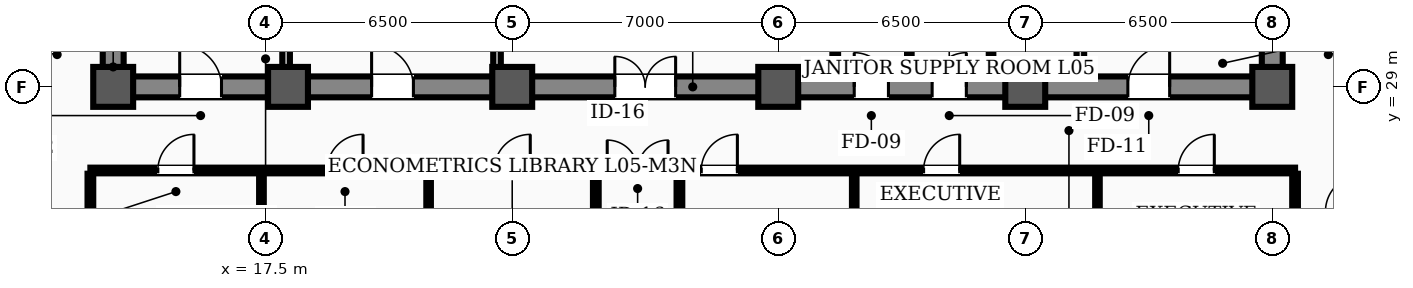
"""IFC4 building model, lengths in metres.
Left out: names, types, materials, properties, quantities, classifications, styles, units other than length and angle.
Written with IfcOpenShell. Run it as: python <this file> out.ifc"""

import sys

from ifc_helpers import new_model, si_unit, direction, frame, frame_2d, origin, origin_2d, place, context, subcontext, project, spatial, rectangle, hollow_rectangle, extrude, element, fill, save


model = new_model("IFC4")
c1 = context("Model", 3, precision=1e-05, world=origin(), true_north=direction((0.0, 1.0)))
c2 = subcontext(c1, "Body", "Model", "MODEL_VIEW")
j1 = project(units=[si_unit("LENGTHUNIT", "METRE"), si_unit("PLANEANGLEUNIT", "RADIAN")], contexts=[c1])
p1 = place(None, origin())
s1 = spatial("IfcSite", under=j1, at=p1, CompositionType="ELEMENT")
p2 = place(p1, origin())
s2 = spatial("IfcBuilding", under=s1, at=p2, CompositionType="ELEMENT")
p3 = place(p2, frame((0.0, 0.0, 22.0)))
s3 = spatial("IfcBuildingStorey", under=s2, at=p3, CompositionType="ELEMENT", Elevation=22.0)
for number, where, z_axis, x_axis in (
    (1, (13.5, 29.0, 0.0), (0.0, 0.0, 1.0), (1.0, 0.0, 0.0)),
    (2, (18.1, 29.0, 0.0), (0.0, 0.0, 1.0), (1.0, 0.0, 0.0)),
    (3, (24.0, 29.0, 0.0), (0.0, 0.0, 1.0), (1.0, 0.0, 0.0)),
    (4, (31.0, 29.0, 0.0), (0.0, 0.0, 1.0), (1.0, 0.0, 0.0)),
    (5, (37.5, 29.0, 0.0), (0.0, 0.0, 1.0), (1.0, 0.0, 0.0)),
    (6, (44.0, 29.0, 0.0), (0.0, 0.0, 1.0), (1.0, 0.0, 0.0)),
):
    element("IfcColumn", number, at=place(p3, frame(where, z_axis=z_axis, x_axis=x_axis)), inside=s3, PredefinedType="COLUMN", context=c2, shape_type="SweptSolid", body=[
        extrude(hollow_rectangle(XDim=1.05, YDim=1.05, WallThickness=0.038, InnerFilletRadius=0.019, OuterFilletRadius=0.057, at=origin_2d()), origin(), (0.0, 0.0, 1.0), 4.5),
    ])
p4 = place(p3, frame((13.5, 29.0, 0.0), z_axis=(0.0, 0.0, 1.0), x_axis=(1.0, 0.0, 0.0)))
e7 = element("IfcWall", 7, at=p4, inside=s3, PredefinedType="SHEAR", context=c2, shape_type="SweptSolid", body=[
    extrude(rectangle(XDim=30.5, YDim=0.55, at=frame_2d((15.25, 0.0))), origin(), (0.0, 0.0, 1.0), 4.32),
])
p5 = place(p4, frame((1.75, 0.0, 0.0)))
e8 = element("IfcOpeningElement", 8, at=p5, cuts=e7, PredefinedType="OPENING", context=c2, shape_type="SweptSolid", body=[
    extrude(rectangle(XDim=1.1, YDim=2.08, at=frame_2d((0.55, 1.04))), frame((0.0, 0.285, 0.0), z_axis=(0.0, -1.0, 0.0), x_axis=(1.0, 0.0, 0.0)), (0.0, 0.0, 1.0), 0.57),
])
p6 = place(p4, frame((26.7, 0.0, 0.0)))
e9 = element("IfcOpeningElement", 9, at=p6, cuts=e7, PredefinedType="OPENING", context=c2, shape_type="SweptSolid", body=[
    extrude(rectangle(XDim=1.1, YDim=2.08, at=frame_2d((0.55, 1.04))), frame((0.0, 0.285, 0.0), z_axis=(0.0, -1.0, 0.0), x_axis=(1.0, 0.0, 0.0)), (0.0, 0.0, 1.0), 0.57),
])
p7 = place(p4, frame((6.8, 0.0, 0.0)))
e10 = element("IfcOpeningElement", 10, at=p7, cuts=e7, PredefinedType="OPENING", context=c2, shape_type="SweptSolid", body=[
    extrude(rectangle(XDim=1.1, YDim=2.08, at=frame_2d((0.55, 1.04))), frame((0.0, 0.285, 0.0), z_axis=(0.0, -1.0, 0.0), x_axis=(1.0, 0.0, 0.0)), (0.0, 0.0, 1.0), 0.57),
])
p8 = place(p4, frame((13.2, 0.0, 0.0)))
e11 = element("IfcOpeningElement", 11, at=p8, cuts=e7, PredefinedType="OPENING", context=c2, shape_type="SweptSolid", body=[
    extrude(rectangle(XDim=1.6, YDim=2.08, at=frame_2d((0.8, 1.04))), frame((0.0, 0.285, 0.0), z_axis=(0.0, -1.0, 0.0), x_axis=(1.0, 0.0, 0.0)), (0.0, 0.0, 1.0), 0.57),
])
p9 = place(p4, frame((19.5, 0.0, 0.0)))
e12 = element("IfcOpeningElement", 12, at=p9, cuts=e7, PredefinedType="OPENING", context=c2, shape_type="SweptSolid", body=[
    extrude(rectangle(XDim=0.9, YDim=2.08, at=frame_2d((0.45, 1.04))), frame((0.0, 0.285, 0.0), z_axis=(0.0, -1.0, 0.0), x_axis=(1.0, 0.0, 0.0)), (0.0, 0.0, 1.0), 0.57),
])
p10 = place(p4, frame((21.55, 0.0, 0.0)))
e13 = element("IfcOpeningElement", 13, at=p10, cuts=e7, PredefinedType="OPENING", context=c2, shape_type="SweptSolid", body=[
    extrude(rectangle(XDim=0.9, YDim=2.08, at=frame_2d((0.45, 1.04))), frame((0.0, 0.285, 0.0), z_axis=(0.0, -1.0, 0.0), x_axis=(1.0, 0.0, 0.0)), (0.0, 0.0, 1.0), 0.57),
])
for number, where, z_axis, x_axis in (
    (14, (13.5, 29.35, 0.0), (0.0, 0.0, 1.0), (0.0, 1.0, 0.0)),
    (15, (44.0, 29.35, 0.0), (0.0, 0.0, 1.0), (0.0, 1.0, 0.0)),
):
    element("IfcWall", number, at=place(p3, frame(where, z_axis=z_axis, x_axis=x_axis)), inside=s3, PredefinedType="SHEAR", context=c2, shape_type="SweptSolid", body=[
        extrude(rectangle(XDim=8.6, YDim=0.55, at=frame_2d((4.3, 0.0))), origin(), (0.0, 0.0, 1.0), 4.32),
    ])
p11 = place(p3, frame((12.9, 26.8, 0.0), z_axis=(0.0, 0.0, 1.0), x_axis=(1.0, 0.0, 0.0)))
e16 = element("IfcWall", 16, at=p11, inside=s3, PredefinedType="PARTITIONING", context=c2, shape_type="SweptSolid", body=[
    extrude(rectangle(XDim=31.7, YDim=0.15, at=frame_2d((15.85, 0.0))), origin(), (0.0, 0.0, 1.0), 3.7),
])
p12 = place(p11, frame((13.6, 0.0, 0.0)))
e17 = element("IfcOpeningElement", 17, at=p12, cuts=e16, PredefinedType="OPENING", context=c2, shape_type="SweptSolid", body=[
    extrude(rectangle(XDim=1.6, YDim=2.08, at=frame_2d((0.8, 1.04))), frame((0.0, 0.085, 0.0), z_axis=(0.0, -1.0, 0.0), x_axis=(1.0, 0.0, 0.0)), (0.0, 0.0, 1.0), 0.17),
])
p13 = place(p11, frame((1.775, 0.0, 0.0)))
e18 = element("IfcOpeningElement", 18, at=p13, cuts=e16, PredefinedType="OPENING", context=c2, shape_type="SweptSolid", body=[
    extrude(rectangle(XDim=0.95, YDim=2.08, at=frame_2d((0.475, 1.04))), frame((0.0, 0.085, 0.0), z_axis=(0.0, -1.0, 0.0), x_axis=(1.0, 0.0, 0.0)), (0.0, 0.0, 1.0), 0.17),
])
p14 = place(p11, frame((6.225, 0.0, 0.0)))
e19 = element("IfcOpeningElement", 19, at=p14, cuts=e16, PredefinedType="OPENING", context=c2, shape_type="SweptSolid", body=[
    extrude(rectangle(XDim=0.95, YDim=2.08, at=frame_2d((0.475, 1.04))), frame((0.0, 0.085, 0.0), z_axis=(0.0, -1.0, 0.0), x_axis=(1.0, 0.0, 0.0)), (0.0, 0.0, 1.0), 0.17),
])
p15 = place(p11, frame((10.625, 0.0, 0.0)))
e20 = element("IfcOpeningElement", 20, at=p15, cuts=e16, PredefinedType="OPENING", context=c2, shape_type="SweptSolid", body=[
    extrude(rectangle(XDim=0.95, YDim=2.08, at=frame_2d((0.475, 1.04))), frame((0.0, 0.085, 0.0), z_axis=(0.0, -1.0, 0.0), x_axis=(1.0, 0.0, 0.0)), (0.0, 0.0, 1.0), 0.17),
])
p16 = place(p11, frame((16.075, 0.0, 0.0)))
e21 = element("IfcOpeningElement", 21, at=p16, cuts=e16, PredefinedType="OPENING", context=c2, shape_type="SweptSolid", body=[
    extrude(rectangle(XDim=0.95, YDim=2.08, at=frame_2d((0.475, 1.04))), frame((0.0, 0.085, 0.0), z_axis=(0.0, -1.0, 0.0), x_axis=(1.0, 0.0, 0.0)), (0.0, 0.0, 1.0), 0.17),
])
p17 = place(p11, frame((21.925, 0.0, 0.0)))
e22 = element("IfcOpeningElement", 22, at=p17, cuts=e16, PredefinedType="OPENING", context=c2, shape_type="SweptSolid", body=[
    extrude(rectangle(XDim=0.95, YDim=2.08, at=frame_2d((0.475, 1.04))), frame((0.0, 0.085, 0.0), z_axis=(0.0, -1.0, 0.0), x_axis=(1.0, 0.0, 0.0)), (0.0, 0.0, 1.0), 0.17),
])
p18 = place(p11, frame((28.625, 0.0, 0.0)))
e23 = element("IfcOpeningElement", 23, at=p18, cuts=e16, PredefinedType="OPENING", context=c2, shape_type="SweptSolid", body=[
    extrude(rectangle(XDim=0.95, YDim=2.08, at=frame_2d((0.475, 1.04))), frame((0.0, 0.085, 0.0), z_axis=(0.0, -1.0, 0.0), x_axis=(1.0, 0.0, 0.0)), (0.0, 0.0, 1.0), 0.17),
])
for number, where, z_axis, x_axis in (
    (24, (18.05, 29.285, 0.0), (0.0, 0.0, 1.0), (0.0, 1.0, 0.0)),
    (25, (38.95, 29.285, 0.0), (0.0, 0.0, 1.0), (0.0, 1.0, 0.0)),
):
    element("IfcWall", number, at=place(p3, frame(where, z_axis=z_axis, x_axis=x_axis)), inside=s3, PredefinedType="STANDARD", context=c2, shape_type="SweptSolid", body=[
        extrude(rectangle(XDim=1.015, YDim=0.2, at=frame_2d((0.508, 0.0))), origin(), (0.0, 0.0, 1.0), 3.9),
    ])
p19 = place(p3, frame((23.6, 29.285, 0.0), z_axis=(0.0, 0.0, 1.0), x_axis=(0.0, 1.0, 0.0)))
e26 = element("IfcWall", 26, at=p19, inside=s3, PredefinedType="STANDARD", context=c2, shape_type="SweptSolid", body=[
    extrude(rectangle(XDim=5.415, YDim=0.2, at=frame_2d((2.708, 0.0))), origin(), (0.0, 0.0, 1.0), 3.7),
])
p20 = place(p3, frame((32.5, 29.285, 0.0), z_axis=(0.0, 0.0, 1.0), x_axis=(0.0, 1.0, 0.0)))
e27 = element("IfcWall", 27, at=p20, inside=s3, PredefinedType="PARTITIONING", context=c2, shape_type="SweptSolid", body=[
    extrude(rectangle(XDim=2.48, YDim=0.15, at=frame_2d((1.24, 0.0))), origin(), (0.0, 0.0, 1.0), 3.9),
])
for number, where, z_axis, x_axis in (
    (28, (36.6, 29.285, 0.0), (0.0, 0.0, 1.0), (0.0, 1.0, 0.0)),
    (29, (34.45, 29.285, 0.0), (0.0, 0.0, 1.0), (0.0, 1.0, 0.0)),
):
    element("IfcWall", number, at=place(p3, frame(where, z_axis=z_axis, x_axis=x_axis)), inside=s3, PredefinedType="PARTITIONING", context=c2, shape_type="SweptSolid", body=[
        extrude(rectangle(XDim=2.48, YDim=0.12, at=frame_2d((1.24, 0.0))), origin(), (0.0, 0.0, 1.0), 3.9),
    ])
for number, where, z_axis, x_axis in (
    (30, (26.2, 19.335, 0.0), (0.0, 0.0, 1.0), (0.0, 1.0, 0.0)),
    (31, (28.4, 19.335, 0.0), (0.0, 0.0, 1.0), (0.0, 1.0, 0.0)),
    (32, (12.9, 19.335, 0.0), (0.0, 0.0, 1.0), (0.0, 1.0, 0.0)),
    (33, (44.6, 19.335, 0.0), (0.0, 0.0, 1.0), (0.0, 1.0, 0.0)),
):
    element("IfcWall", number, at=place(p3, frame(where, z_axis=z_axis, x_axis=x_axis)), inside=s3, PredefinedType="PARTITIONING", context=c2, shape_type="SweptSolid", body=[
        extrude(rectangle(XDim=7.38, YDim=0.15, at=frame_2d((3.69, 0.0))), origin(), (0.0, 0.0, 1.0), 3.6),
    ])
for number, where, z_axis, x_axis in (
    (34, (17.4, 19.335, 0.0), (0.0, 0.0, 1.0), (0.0, 1.0, 0.0)),
    (35, (21.8, 19.335, 0.0), (0.0, 0.0, 1.0), (0.0, 1.0, 0.0)),
    (36, (33.0, 19.335, 0.0), (0.0, 0.0, 1.0), (0.0, 1.0, 0.0)),
    (37, (39.4, 19.335, 0.0), (0.0, 0.0, 1.0), (0.0, 1.0, 0.0)),
):
    element("IfcWall", number, at=place(p3, frame(where, z_axis=z_axis, x_axis=x_axis)), inside=s3, PredefinedType="PARTITIONING", context=c2, shape_type="SweptSolid", body=[
        extrude(rectangle(XDim=7.38, YDim=0.12, at=frame_2d((3.69, 0.0))), origin(), (0.0, 0.0, 1.0), 3.6),
    ])
p21 = place(p5, origin())
e38 = element("IfcDoor", 38, at=p21, inside=s3, OperationType="SINGLE_SWING_LEFT", PredefinedType="DOOR", context=c2, shape_type="SweptSolid", body=[
    extrude(rectangle(XDim=1.1, YDim=2.08, at=frame_2d((0.55, 1.04))), frame((0.0, 0.025, 0.0), z_axis=(0.0, -1.0, 0.0), x_axis=(1.0, 0.0, 0.0)), (0.0, 0.0, 1.0), 0.05),
])
fill(e8, e38)
p22 = place(p6, origin())
e39 = element("IfcDoor", 39, at=p22, inside=s3, OperationType="SINGLE_SWING_RIGHT", PredefinedType="DOOR", context=c2, shape_type="SweptSolid", body=[
    extrude(rectangle(XDim=1.1, YDim=2.08, at=frame_2d((0.55, 1.04))), frame((0.0, 0.025, 0.0), z_axis=(0.0, -1.0, 0.0), x_axis=(1.0, 0.0, 0.0)), (0.0, 0.0, 1.0), 0.05),
])
fill(e9, e39)
p23 = place(p7, origin())
e40 = element("IfcDoor", 40, at=p23, inside=s3, OperationType="SINGLE_SWING_LEFT", PredefinedType="DOOR", context=c2, shape_type="SweptSolid", body=[
    extrude(rectangle(XDim=1.1, YDim=2.08, at=frame_2d((0.55, 1.04))), frame((0.0, 0.025, 0.0), z_axis=(0.0, -1.0, 0.0), x_axis=(1.0, 0.0, 0.0)), (0.0, 0.0, 1.0), 0.05),
])
fill(e10, e40)
p24 = place(p8, origin())
e41 = element("IfcDoor", 41, at=p24, inside=s3, OperationType="DOUBLE_DOOR_SINGLE_SWING", PredefinedType="DOOR", context=c2, shape_type="SweptSolid", body=[
    extrude(rectangle(XDim=1.6, YDim=2.08, at=frame_2d((0.8, 1.04))), frame((0.0, 0.025, 0.0), z_axis=(0.0, -1.0, 0.0), x_axis=(1.0, 0.0, 0.0)), (0.0, 0.0, 1.0), 0.05),
])
fill(e11, e41)
p25 = place(p9, origin())
e42 = element("IfcDoor", 42, at=p25, inside=s3, OperationType="SINGLE_SWING_LEFT", PredefinedType="DOOR", context=c2, shape_type="SweptSolid", body=[
    extrude(rectangle(XDim=0.9, YDim=2.08, at=frame_2d((0.45, 1.04))), frame((0.0, 0.025, 0.0), z_axis=(0.0, -1.0, 0.0), x_axis=(1.0, 0.0, 0.0)), (0.0, 0.0, 1.0), 0.05),
])
fill(e12, e42)
p26 = place(p10, origin())
e43 = element("IfcDoor", 43, at=p26, inside=s3, OperationType="SINGLE_SWING_RIGHT", PredefinedType="DOOR", context=c2, shape_type="SweptSolid", body=[
    extrude(rectangle(XDim=0.9, YDim=2.08, at=frame_2d((0.45, 1.04))), frame((0.0, 0.025, 0.0), z_axis=(0.0, -1.0, 0.0), x_axis=(1.0, 0.0, 0.0)), (0.0, 0.0, 1.0), 0.05),
])
fill(e13, e43)
p27 = place(p12, origin())
e44 = element("IfcDoor", 44, at=p27, inside=s3, OperationType="DOUBLE_DOOR_SINGLE_SWING", PredefinedType="DOOR", context=c2, shape_type="SweptSolid", body=[
    extrude(rectangle(XDim=1.6, YDim=2.08, at=frame_2d((0.8, 1.04))), frame((0.0, 0.025, 0.0), z_axis=(0.0, -1.0, 0.0), x_axis=(1.0, 0.0, 0.0)), (0.0, 0.0, 1.0), 0.05),
])
fill(e17, e44)
p28 = place(p13, origin())
e45 = element("IfcDoor", 45, at=p28, inside=s3, OperationType="SINGLE_SWING_RIGHT", PredefinedType="DOOR", context=c2, shape_type="SweptSolid", body=[
    extrude(rectangle(XDim=0.95, YDim=2.08, at=frame_2d((0.475, 1.04))), frame((0.0, 0.025, 0.0), z_axis=(0.0, -1.0, 0.0), x_axis=(1.0, 0.0, 0.0)), (0.0, 0.0, 1.0), 0.05),
])
fill(e18, e45)
p29 = place(p14, origin())
e46 = element("IfcDoor", 46, at=p29, inside=s3, OperationType="SINGLE_SWING_RIGHT", PredefinedType="DOOR", context=c2, shape_type="SweptSolid", body=[
    extrude(rectangle(XDim=0.95, YDim=2.08, at=frame_2d((0.475, 1.04))), frame((0.0, 0.025, 0.0), z_axis=(0.0, -1.0, 0.0), x_axis=(1.0, 0.0, 0.0)), (0.0, 0.0, 1.0), 0.05),
])
fill(e19, e46)
p30 = place(p15, origin())
e47 = element("IfcDoor", 47, at=p30, inside=s3, OperationType="SINGLE_SWING_RIGHT", PredefinedType="DOOR", context=c2, shape_type="SweptSolid", body=[
    extrude(rectangle(XDim=0.95, YDim=2.08, at=frame_2d((0.475, 1.04))), frame((0.0, 0.025, 0.0), z_axis=(0.0, -1.0, 0.0), x_axis=(1.0, 0.0, 0.0)), (0.0, 0.0, 1.0), 0.05),
])
fill(e20, e47)
p31 = place(p16, origin())
e48 = element("IfcDoor", 48, at=p31, inside=s3, OperationType="SINGLE_SWING_RIGHT", PredefinedType="DOOR", context=c2, shape_type="SweptSolid", body=[
    extrude(rectangle(XDim=0.95, YDim=2.08, at=frame_2d((0.475, 1.04))), frame((0.0, 0.025, 0.0), z_axis=(0.0, -1.0, 0.0), x_axis=(1.0, 0.0, 0.0)), (0.0, 0.0, 1.0), 0.05),
])
fill(e21, e48)
p32 = place(p17, origin())
e49 = element("IfcDoor", 49, at=p32, inside=s3, OperationType="SINGLE_SWING_RIGHT", PredefinedType="DOOR", context=c2, shape_type="SweptSolid", body=[
    extrude(rectangle(XDim=0.95, YDim=2.08, at=frame_2d((0.475, 1.04))), frame((0.0, 0.025, 0.0), z_axis=(0.0, -1.0, 0.0), x_axis=(1.0, 0.0, 0.0)), (0.0, 0.0, 1.0), 0.05),
])
fill(e22, e49)
p33 = place(p18, origin())
e50 = element("IfcDoor", 50, at=p33, inside=s3, OperationType="SINGLE_SWING_RIGHT", PredefinedType="DOOR", context=c2, shape_type="SweptSolid", body=[
    extrude(rectangle(XDim=0.95, YDim=2.08, at=frame_2d((0.475, 1.04))), frame((0.0, 0.025, 0.0), z_axis=(0.0, -1.0, 0.0), x_axis=(1.0, 0.0, 0.0)), (0.0, 0.0, 1.0), 0.05),
])
fill(e23, e50)
save(model, sys.argv[1])
